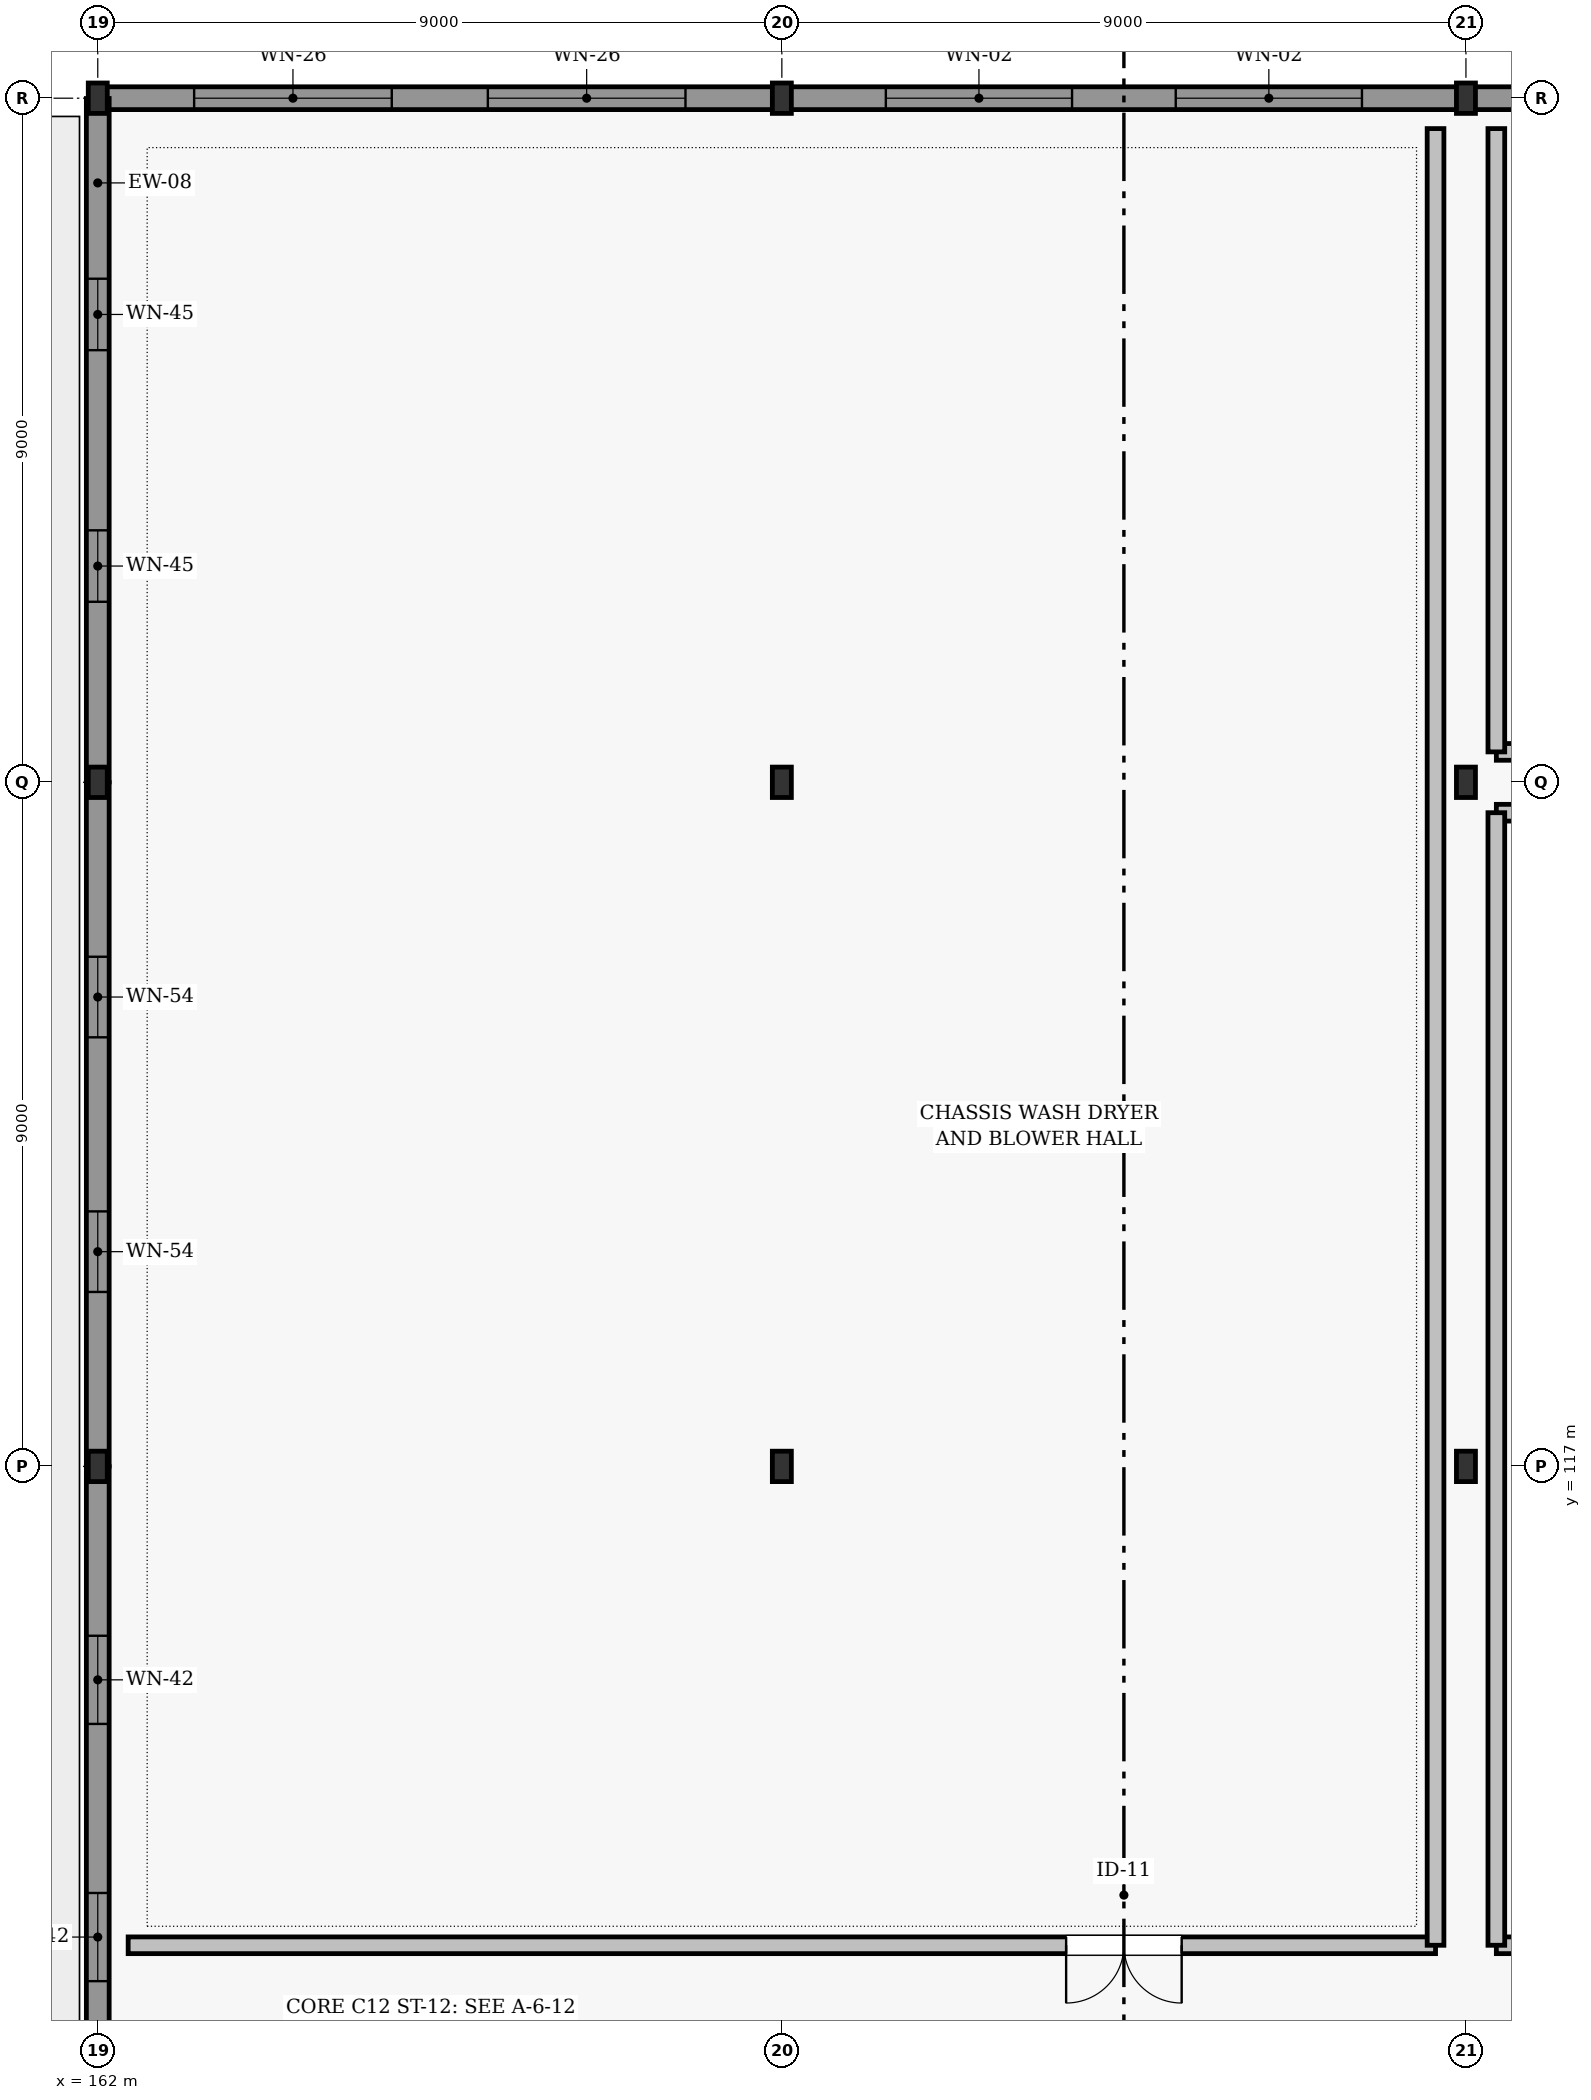
"""IFC4 building model, lengths in metres.
Left out: names, types, materials, properties, quantities, classifications, styles, units other than length and angle.
Written with IfcOpenShell. Run it as: python <this file> out.ifc"""

import sys

from ifc_helpers import new_model, si_unit, direction, frame, frame_2d, origin, origin_2d, place, context, subcontext, project, spatial, rectangle, i_section, extrude, element, fill, save


model = new_model("IFC4")
c1 = context("Model", 3, precision=1e-05, world=origin(), true_north=direction((0.0, 1.0)))
c2 = subcontext(c1, "Body", "Model", "MODEL_VIEW")
j1 = project(units=[si_unit("LENGTHUNIT", "METRE"), si_unit("PLANEANGLEUNIT", "RADIAN")], contexts=[c1])
p1 = place(None, origin())
s1 = spatial("IfcSite", under=j1, at=p1, CompositionType="ELEMENT")
p2 = place(p1, origin())
s2 = spatial("IfcBuilding", under=s1, at=p2, CompositionType="ELEMENT")
p3 = place(p2, origin())
s3 = spatial("IfcBuildingStorey", under=s2, at=p3, CompositionType="ELEMENT", Elevation=0.0)
for number, where, z_axis, x_axis in (
    (1, (162.0, 117.0, 0.0), (0.0, 0.0, 1.0), (1.0, 0.0, 0.0)),
    (2, (162.0, 126.0, 0.0), (0.0, 0.0, 1.0), (1.0, 0.0, 0.0)),
    (3, (162.0, 135.0, 0.0), (0.0, 0.0, 1.0), (1.0, 0.0, 0.0)),
    (4, (171.0, 117.0, 0.0), (0.0, 0.0, 1.0), (1.0, 0.0, 0.0)),
    (5, (171.0, 126.0, 0.0), (0.0, 0.0, 1.0), (1.0, 0.0, 0.0)),
    (6, (171.0, 135.0, 0.0), (0.0, 0.0, 1.0), (1.0, 0.0, 0.0)),
    (7, (180.0, 117.0, 0.0), (0.0, 0.0, 1.0), (1.0, 0.0, 0.0)),
    (8, (180.0, 126.0, 0.0), (0.0, 0.0, 1.0), (1.0, 0.0, 0.0)),
    (9, (180.0, 135.0, 0.0), (0.0, 0.0, 1.0), (1.0, 0.0, 0.0)),
):
    element("IfcColumn", number, at=place(p3, frame(where, z_axis=z_axis, x_axis=x_axis)), inside=s3, PredefinedType="COLUMN", context=c2, shape_type="SweptSolid", body=[
        extrude(i_section(OverallWidth=0.25, OverallDepth=0.4, WebThickness=0.01, FlangeThickness=0.013, FilletRadius=0.014, at=origin_2d()), origin(), (0.0, 0.0, 1.0), 4.8),
    ])
p4 = place(p3, frame((162.004, 135.0, 0.0), z_axis=(0.0, 0.0, 1.0), x_axis=(1.0, 0.0, 0.0)))
e10 = element("IfcWall", 10, at=p4, inside=s3, PredefinedType="SOLIDWALL", context=c2, shape_type="SweptSolid", body=[
    extrude(rectangle(XDim=8.992, YDim=0.3, at=frame_2d((4.496, 0.0))), origin(), (0.0, 0.0, 1.0), 3.912),
])
p5 = place(p4, frame((1.264, 0.0, 1.45)))
e11 = element("IfcOpeningElement", 11, at=p5, cuts=e10, PredefinedType="OPENING", context=c2, shape_type="SweptSolid", body=[
    extrude(rectangle(XDim=2.6, YDim=1.24, at=frame_2d((1.3, 0.62))), frame((0.0, 0.16, 0.0), z_axis=(0.0, -1.0, 0.0), x_axis=(1.0, 0.0, 0.0)), (0.0, 0.0, 1.0), 0.32),
])
p6 = place(p4, frame((5.128, 0.0, 1.45)))
e12 = element("IfcOpeningElement", 12, at=p6, cuts=e10, PredefinedType="OPENING", context=c2, shape_type="SweptSolid", body=[
    extrude(rectangle(XDim=2.6, YDim=1.24, at=frame_2d((1.3, 0.62))), frame((0.0, 0.16, 0.0), z_axis=(0.0, -1.0, 0.0), x_axis=(1.0, 0.0, 0.0)), (0.0, 0.0, 1.0), 0.32),
])
p7 = place(p3, frame((171.004, 135.0, 0.0), z_axis=(0.0, 0.0, 1.0), x_axis=(1.0, 0.0, 0.0)))
e13 = element("IfcWall", 13, at=p7, inside=s3, PredefinedType="SOLIDWALL", context=c2, shape_type="SweptSolid", body=[
    extrude(rectangle(XDim=8.992, YDim=0.3, at=frame_2d((4.496, 0.0))), origin(), (0.0, 0.0, 1.0), 3.912),
])
p8 = place(p7, frame((1.364, 0.0, 1.45)))
e14 = element("IfcOpeningElement", 14, at=p8, cuts=e13, PredefinedType="OPENING", context=c2, shape_type="SweptSolid", body=[
    extrude(rectangle(XDim=2.45, YDim=1.2, at=frame_2d((1.225, 0.6))), frame((0.0, 0.16, 0.0), z_axis=(0.0, -1.0, 0.0), x_axis=(1.0, 0.0, 0.0)), (0.0, 0.0, 1.0), 0.32),
])
p9 = place(p7, frame((5.178, 0.0, 1.45)))
e15 = element("IfcOpeningElement", 15, at=p9, cuts=e13, PredefinedType="OPENING", context=c2, shape_type="SweptSolid", body=[
    extrude(rectangle(XDim=2.45, YDim=1.2, at=frame_2d((1.225, 0.6))), frame((0.0, 0.16, 0.0), z_axis=(0.0, -1.0, 0.0), x_axis=(1.0, 0.0, 0.0)), (0.0, 0.0, 1.0), 0.32),
])
p10 = place(p3, frame((180.004, 135.0, 0.0), z_axis=(0.0, 0.0, 1.0), x_axis=(1.0, 0.0, 0.0)))
e16 = element("IfcWall", 16, at=p10, inside=s3, PredefinedType="SOLIDWALL", context=c2, shape_type="SweptSolid", body=[
    extrude(rectangle(XDim=8.992, YDim=0.3, at=frame_2d((4.496, 0.0))), origin(), (0.0, 0.0, 1.0), 3.912),
])
p11 = place(p10, frame((1.464, 0.0, 1.5)))
e17 = element("IfcOpeningElement", 17, at=p11, cuts=e16, PredefinedType="OPENING", context=c2, shape_type="SweptSolid", body=[
    extrude(rectangle(XDim=2.3, YDim=1.16, at=frame_2d((1.15, 0.58))), frame((0.0, 0.16, 0.0), z_axis=(0.0, -1.0, 0.0), x_axis=(1.0, 0.0, 0.0)), (0.0, 0.0, 1.0), 0.32),
])
p12 = place(p10, frame((5.228, 0.0, 1.5)))
e18 = element("IfcOpeningElement", 18, at=p12, cuts=e16, PredefinedType="OPENING", context=c2, shape_type="SweptSolid", body=[
    extrude(rectangle(XDim=2.3, YDim=1.16, at=frame_2d((1.15, 0.58))), frame((0.0, 0.16, 0.0), z_axis=(0.0, -1.0, 0.0), x_axis=(1.0, 0.0, 0.0)), (0.0, 0.0, 1.0), 0.32),
])
p13 = place(p3, frame((162.0, 108.004, 0.0), z_axis=(0.0, 0.0, 1.0), x_axis=(0.0, 1.0, 0.0)))
e19 = element("IfcWall", 19, at=p13, inside=s3, PredefinedType="SOLIDWALL", context=c2, shape_type="SweptSolid", body=[
    extrude(rectangle(XDim=8.992, YDim=0.3, at=frame_2d((4.496, 0.0))), origin(), (0.0, 0.0, 1.0), 4.012),
])
p14 = place(p13, frame((2.224, 0.0, 0.85)))
e20 = element("IfcOpeningElement", 20, at=p14, cuts=e19, PredefinedType="OPENING", context=c2, shape_type="SweptSolid", body=[
    extrude(rectangle(XDim=1.16, YDim=1.4, at=frame_2d((0.58, 0.7))), frame((0.0, 0.16, 0.0), z_axis=(0.0, -1.0, 0.0), x_axis=(1.0, 0.0, 0.0)), (0.0, 0.0, 1.0), 0.32),
])
p15 = place(p13, frame((5.608, 0.0, 0.85)))
e21 = element("IfcOpeningElement", 21, at=p15, cuts=e19, PredefinedType="OPENING", context=c2, shape_type="SweptSolid", body=[
    extrude(rectangle(XDim=1.16, YDim=1.4, at=frame_2d((0.58, 0.7))), frame((0.0, 0.16, 0.0), z_axis=(0.0, -1.0, 0.0), x_axis=(1.0, 0.0, 0.0)), (0.0, 0.0, 1.0), 0.32),
])
p16 = place(p3, frame((162.0, 117.004, 0.0), z_axis=(0.0, 0.0, 1.0), x_axis=(0.0, 1.0, 0.0)))
e22 = element("IfcWall", 22, at=p16, inside=s3, PredefinedType="SOLIDWALL", context=c2, shape_type="SweptSolid", body=[
    extrude(rectangle(XDim=8.992, YDim=0.3, at=frame_2d((4.496, 0.0))), origin(), (0.0, 0.0, 1.0), 4.012),
])
p17 = place(p16, frame((2.291, 0.0, 0.85)))
e23 = element("IfcOpeningElement", 23, at=p17, cuts=e22, PredefinedType="OPENING", context=c2, shape_type="SweptSolid", body=[
    extrude(rectangle(XDim=1.06, YDim=1.35, at=frame_2d((0.53, 0.675))), frame((0.0, 0.16, 0.0), z_axis=(0.0, -1.0, 0.0), x_axis=(1.0, 0.0, 0.0)), (0.0, 0.0, 1.0), 0.32),
])
p18 = place(p16, frame((5.641, 0.0, 0.85)))
e24 = element("IfcOpeningElement", 24, at=p18, cuts=e22, PredefinedType="OPENING", context=c2, shape_type="SweptSolid", body=[
    extrude(rectangle(XDim=1.06, YDim=1.35, at=frame_2d((0.53, 0.675))), frame((0.0, 0.16, 0.0), z_axis=(0.0, -1.0, 0.0), x_axis=(1.0, 0.0, 0.0)), (0.0, 0.0, 1.0), 0.32),
])
p19 = place(p3, frame((162.0, 126.004, 0.0), z_axis=(0.0, 0.0, 1.0), x_axis=(0.0, 1.0, 0.0)))
e25 = element("IfcWall", 25, at=p19, inside=s3, PredefinedType="SOLIDWALL", context=c2, shape_type="SweptSolid", body=[
    extrude(rectangle(XDim=8.992, YDim=0.3, at=frame_2d((4.496, 0.0))), origin(), (0.0, 0.0, 1.0), 3.912),
])
p20 = place(p19, frame((2.371, 0.0, 0.85)))
e26 = element("IfcOpeningElement", 26, at=p20, cuts=e25, PredefinedType="OPENING", context=c2, shape_type="SweptSolid", body=[
    extrude(rectangle(XDim=0.94, YDim=1.28, at=frame_2d((0.47, 0.64))), frame((0.0, 0.16, 0.0), z_axis=(0.0, -1.0, 0.0), x_axis=(1.0, 0.0, 0.0)), (0.0, 0.0, 1.0), 0.32),
])
p21 = place(p19, frame((5.681, 0.0, 0.85)))
e27 = element("IfcOpeningElement", 27, at=p21, cuts=e25, PredefinedType="OPENING", context=c2, shape_type="SweptSolid", body=[
    extrude(rectangle(XDim=0.94, YDim=1.28, at=frame_2d((0.47, 0.64))), frame((0.0, 0.16, 0.0), z_axis=(0.0, -1.0, 0.0), x_axis=(1.0, 0.0, 0.0)), (0.0, 0.0, 1.0), 0.32),
])
p22 = place(p3, frame((162.4, 110.7, 0.0), z_axis=(0.0, 0.0, 1.0), x_axis=(1.0, 0.0, 0.0)))
e28 = element("IfcWall", 28, at=p22, inside=s3, PredefinedType="SOLIDWALL", context=c2, shape_type="SweptSolid", body=[
    extrude(rectangle(XDim=17.2, YDim=0.22, at=frame_2d((8.6, 0.0))), origin(), (0.0, 0.0, 1.0), 4.115),
])
p23 = place(p22, frame((12.34, 0.0, 0.0)))
e29 = element("IfcOpeningElement", 29, at=p23, cuts=e28, PredefinedType="OPENING", context=c2, shape_type="SweptSolid", body=[
    extrude(rectangle(XDim=1.52, YDim=2.16, at=frame_2d((0.76, 1.08))), frame((0.0, 0.12, 0.0), z_axis=(0.0, -1.0, 0.0), x_axis=(1.0, 0.0, 0.0)), (0.0, 0.0, 1.0), 0.24),
])
p24 = place(p3, frame((179.6, 110.7, 0.0), z_axis=(0.0, 0.0, 1.0), x_axis=(0.0, 1.0, 0.0)))
e30 = element("IfcWall", 30, at=p24, inside=s3, PredefinedType="SOLIDWALL", context=c2, shape_type="SweptSolid", body=[
    extrude(rectangle(XDim=23.9, YDim=0.22, at=frame_2d((11.95, 0.0))), origin(), (0.0, 0.0, 1.0), 4.165),
])
p25 = place(p3, frame((180.4, 110.7, 0.0), z_axis=(0.0, 0.0, 1.0), x_axis=(1.0, 0.0, 0.0)))
e31 = element("IfcWall", 31, at=p25, inside=s3, PredefinedType="SOLIDWALL", context=c2, shape_type="SweptSolid", body=[
    extrude(rectangle(XDim=26.4, YDim=0.22, at=frame_2d((13.2, 0.0))), origin(), (0.0, 0.0, 1.0), 4.115),
])
p26 = place(p25, frame((12.39, 0.0, 0.0)))
e32 = element("IfcOpeningElement", 32, at=p26, cuts=e31, PredefinedType="OPENING", context=c2, shape_type="SweptSolid", body=[
    extrude(rectangle(XDim=1.42, YDim=2.12, at=frame_2d((0.71, 1.06))), frame((0.0, 0.12, 0.0), z_axis=(0.0, -1.0, 0.0), x_axis=(1.0, 0.0, 0.0)), (0.0, 0.0, 1.0), 0.24),
])
p27 = place(p3, frame((180.4, 125.6, 0.0), z_axis=(0.0, 0.0, 1.0), x_axis=(1.0, 0.0, 0.0)))
e33 = element("IfcWall", 33, at=p27, inside=s3, PredefinedType="SOLIDWALL", context=c2, shape_type="SweptSolid", body=[
    extrude(rectangle(XDim=26.4, YDim=0.22, at=frame_2d((13.2, 0.0))), origin(), (0.0, 0.0, 1.0), 4.115),
])
p28 = place(p3, frame((180.4, 110.7, 0.0), z_axis=(0.0, 0.0, 1.0), x_axis=(0.0, 1.0, 0.0)))
e34 = element("IfcWall", 34, at=p28, inside=s3, PredefinedType="SOLIDWALL", context=c2, shape_type="SweptSolid", body=[
    extrude(rectangle(XDim=14.9, YDim=0.22, at=frame_2d((7.45, 0.0))), origin(), (0.0, 0.0, 1.0), 4.165),
])
p29 = place(p3, frame((180.4, 126.4, 0.0), z_axis=(0.0, 0.0, 1.0), x_axis=(1.0, 0.0, 0.0)))
e35 = element("IfcWall", 35, at=p29, inside=s3, PredefinedType="SOLIDWALL", context=c2, shape_type="SweptSolid", body=[
    extrude(rectangle(XDim=26.4, YDim=0.22, at=frame_2d((13.2, 0.0))), origin(), (0.0, 0.0, 1.0), 4.115),
])
p30 = place(p3, frame((180.4, 126.4, 0.0), z_axis=(0.0, 0.0, 1.0), x_axis=(0.0, 1.0, 0.0)))
e36 = element("IfcWall", 36, at=p30, inside=s3, PredefinedType="SOLIDWALL", context=c2, shape_type="SweptSolid", body=[
    extrude(rectangle(XDim=8.2, YDim=0.22, at=frame_2d((4.1, 0.0))), origin(), (0.0, 0.0, 1.0), 4.55),
])
p31 = place(p5, origin())
e37 = element("IfcWindow", 37, at=p31, inside=s3, PartitioningType="SINGLE_PANEL", PredefinedType="WINDOW", context=c2, shape_type="SweptSolid", body=[
    extrude(rectangle(XDim=2.6, YDim=1.24, at=frame_2d((1.3, 0.62))), frame((0.0, 0.03, 0.0), z_axis=(0.0, -1.0, 0.0), x_axis=(1.0, 0.0, 0.0)), (0.0, 0.0, 1.0), 0.06),
])
fill(e11, e37)
p32 = place(p6, origin())
e38 = element("IfcWindow", 38, at=p32, inside=s3, PartitioningType="SINGLE_PANEL", PredefinedType="WINDOW", context=c2, shape_type="SweptSolid", body=[
    extrude(rectangle(XDim=2.6, YDim=1.24, at=frame_2d((1.3, 0.62))), frame((0.0, 0.03, 0.0), z_axis=(0.0, -1.0, 0.0), x_axis=(1.0, 0.0, 0.0)), (0.0, 0.0, 1.0), 0.06),
])
fill(e12, e38)
p33 = place(p8, origin())
e39 = element("IfcWindow", 39, at=p33, inside=s3, PartitioningType="SINGLE_PANEL", PredefinedType="WINDOW", context=c2, shape_type="SweptSolid", body=[
    extrude(rectangle(XDim=2.45, YDim=1.2, at=frame_2d((1.225, 0.6))), frame((0.0, 0.03, 0.0), z_axis=(0.0, -1.0, 0.0), x_axis=(1.0, 0.0, 0.0)), (0.0, 0.0, 1.0), 0.06),
])
fill(e14, e39)
p34 = place(p9, origin())
e40 = element("IfcWindow", 40, at=p34, inside=s3, PartitioningType="SINGLE_PANEL", PredefinedType="WINDOW", context=c2, shape_type="SweptSolid", body=[
    extrude(rectangle(XDim=2.45, YDim=1.2, at=frame_2d((1.225, 0.6))), frame((0.0, 0.03, 0.0), z_axis=(0.0, -1.0, 0.0), x_axis=(1.0, 0.0, 0.0)), (0.0, 0.0, 1.0), 0.06),
])
fill(e15, e40)
p35 = place(p14, origin())
e41 = element("IfcWindow", 41, at=p35, inside=s3, PartitioningType="SINGLE_PANEL", PredefinedType="WINDOW", context=c2, shape_type="SweptSolid", body=[
    extrude(rectangle(XDim=1.16, YDim=1.4, at=frame_2d((0.58, 0.7))), frame((0.0, 0.03, 0.0), z_axis=(0.0, -1.0, 0.0), x_axis=(1.0, 0.0, 0.0)), (0.0, 0.0, 1.0), 0.06),
])
fill(e20, e41)
p36 = place(p15, origin())
e42 = element("IfcWindow", 42, at=p36, inside=s3, PartitioningType="SINGLE_PANEL", PredefinedType="WINDOW", context=c2, shape_type="SweptSolid", body=[
    extrude(rectangle(XDim=1.16, YDim=1.4, at=frame_2d((0.58, 0.7))), frame((0.0, 0.03, 0.0), z_axis=(0.0, -1.0, 0.0), x_axis=(1.0, 0.0, 0.0)), (0.0, 0.0, 1.0), 0.06),
])
fill(e21, e42)
p37 = place(p17, origin())
e43 = element("IfcWindow", 43, at=p37, inside=s3, PartitioningType="SINGLE_PANEL", PredefinedType="WINDOW", context=c2, shape_type="SweptSolid", body=[
    extrude(rectangle(XDim=1.06, YDim=1.35, at=frame_2d((0.53, 0.675))), frame((0.0, 0.03, 0.0), z_axis=(0.0, -1.0, 0.0), x_axis=(1.0, 0.0, 0.0)), (0.0, 0.0, 1.0), 0.06),
])
fill(e23, e43)
p38 = place(p18, origin())
e44 = element("IfcWindow", 44, at=p38, inside=s3, PartitioningType="SINGLE_PANEL", PredefinedType="WINDOW", context=c2, shape_type="SweptSolid", body=[
    extrude(rectangle(XDim=1.06, YDim=1.35, at=frame_2d((0.53, 0.675))), frame((0.0, 0.03, 0.0), z_axis=(0.0, -1.0, 0.0), x_axis=(1.0, 0.0, 0.0)), (0.0, 0.0, 1.0), 0.06),
])
fill(e24, e44)
p39 = place(p20, origin())
e45 = element("IfcWindow", 45, at=p39, inside=s3, PartitioningType="SINGLE_PANEL", PredefinedType="WINDOW", context=c2, shape_type="SweptSolid", body=[
    extrude(rectangle(XDim=0.94, YDim=1.28, at=frame_2d((0.47, 0.64))), frame((0.0, 0.03, 0.0), z_axis=(0.0, -1.0, 0.0), x_axis=(1.0, 0.0, 0.0)), (0.0, 0.0, 1.0), 0.06),
])
fill(e26, e45)
p40 = place(p21, origin())
e46 = element("IfcWindow", 46, at=p40, inside=s3, PartitioningType="SINGLE_PANEL", PredefinedType="WINDOW", context=c2, shape_type="SweptSolid", body=[
    extrude(rectangle(XDim=0.94, YDim=1.28, at=frame_2d((0.47, 0.64))), frame((0.0, 0.03, 0.0), z_axis=(0.0, -1.0, 0.0), x_axis=(1.0, 0.0, 0.0)), (0.0, 0.0, 1.0), 0.06),
])
fill(e27, e46)
p41 = place(p23, frame((1.52, 0.0, 0.0), z_axis=(0.0, 0.0, 1.0), x_axis=(-1.0, 0.0, 0.0)))
e47 = element("IfcDoor", 47, at=p41, inside=s3, OperationType="DOUBLE_SWING_LEFT", PredefinedType="DOOR", context=c2, shape_type="SweptSolid", body=[
    extrude(rectangle(XDim=1.52, YDim=2.16, at=frame_2d((0.76, 1.08))), frame((0.0, 0.025, 0.0), z_axis=(0.0, -1.0, 0.0), x_axis=(1.0, 0.0, 0.0)), (0.0, 0.0, 1.0), 0.05),
])
fill(e29, e47)
save(model, sys.argv[1])
